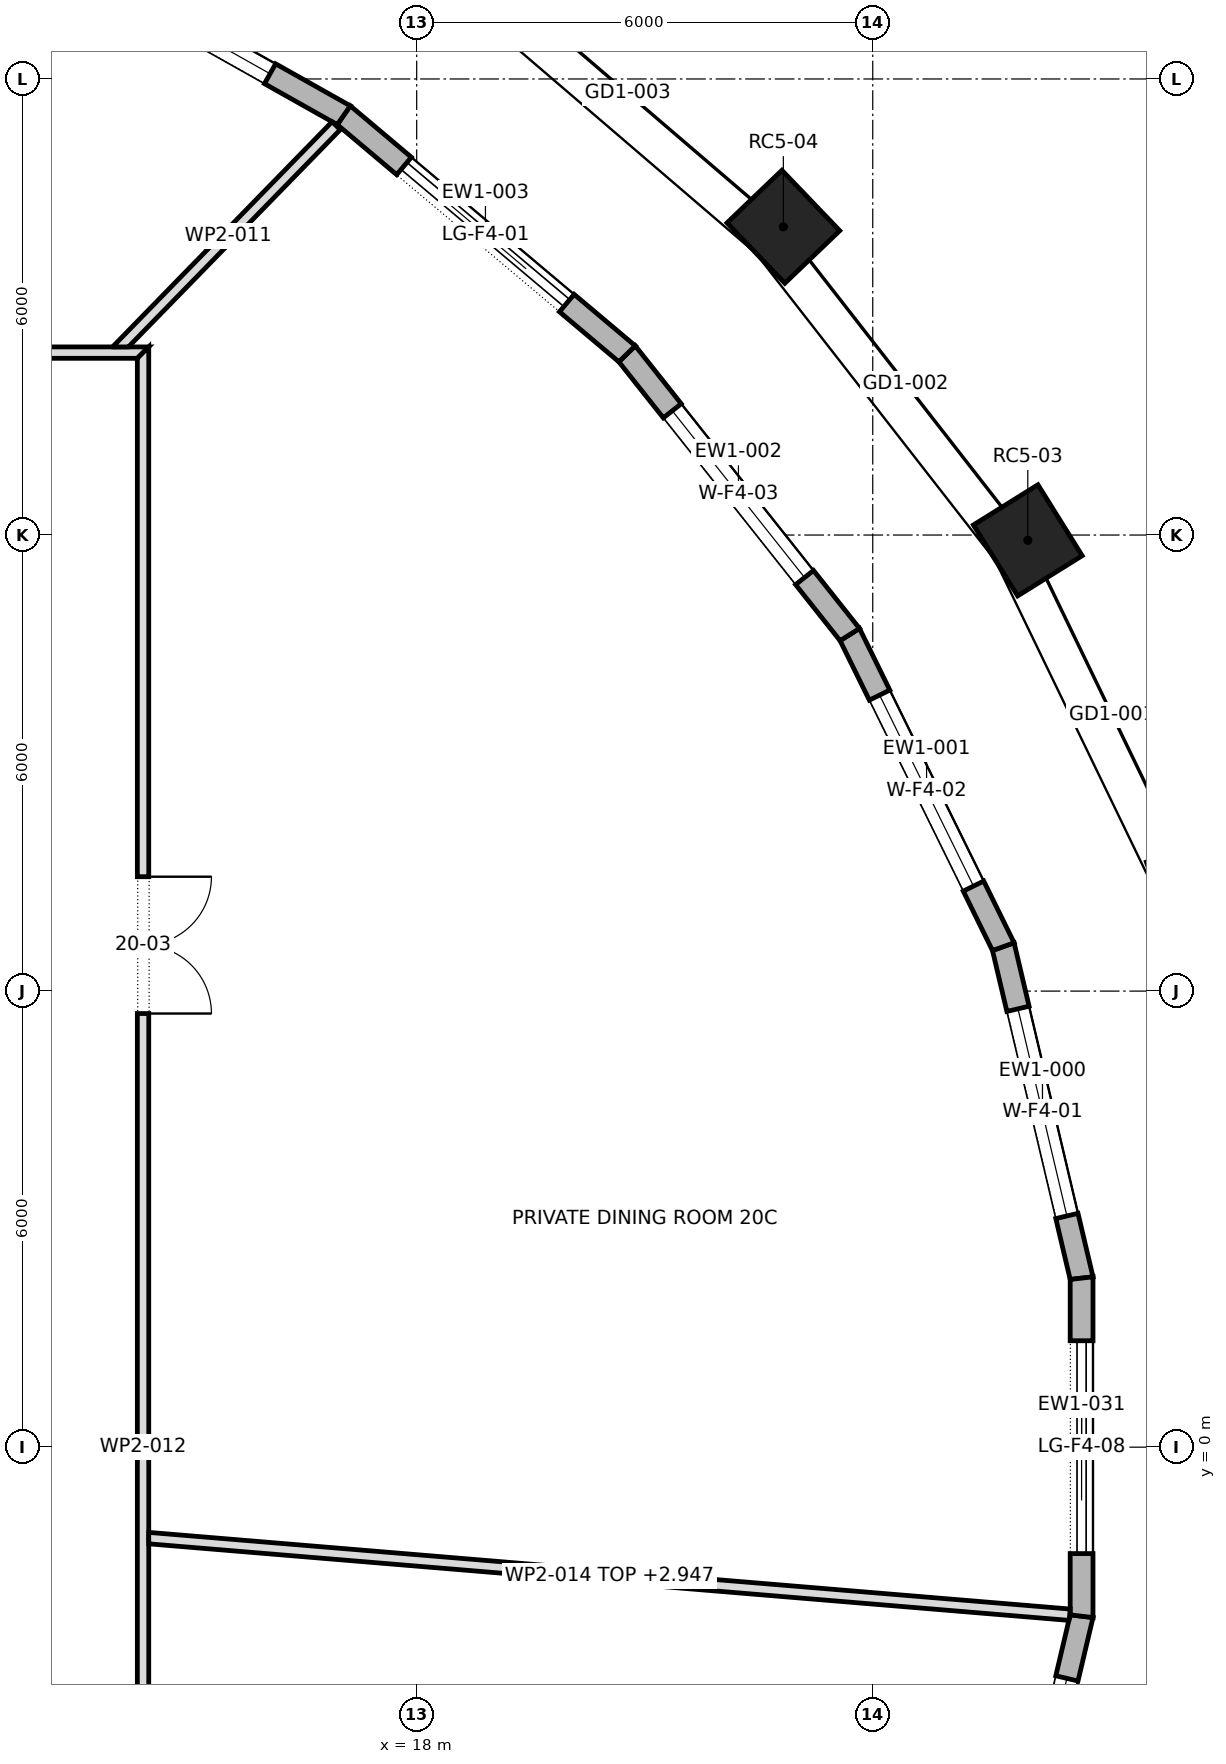
"""IFC4 building model, lengths in metres.
Left out: names, types, materials, properties, quantities, classifications, styles, units other than length and angle.
Written with IfcOpenShell. Run it as: python <this file> out.ifc"""

import sys

from ifc_helpers import new_model, si_unit, direction, frame, frame_2d, origin, origin_2d, place, context, subcontext, project, spatial, polyline, rectangle, outline, extrude, element, fill, save


model = new_model("IFC4")
c1 = context("Model", 3, precision=1e-05, world=origin(), true_north=direction((0.0, 1.0)))
c2 = subcontext(c1, "Body", "Model", "MODEL_VIEW")
j1 = project(units=[si_unit("LENGTHUNIT", "METRE"), si_unit("PLANEANGLEUNIT", "RADIAN")], contexts=[c1])
p1 = place(None, origin())
s1 = spatial("IfcSite", under=j1, at=p1, CompositionType="ELEMENT")
p2 = place(p1, origin())
s2 = spatial("IfcBuilding", under=s1, at=p2, CompositionType="ELEMENT")
p3 = place(p2, frame((0.0, 0.0, 280.3)))
s3 = spatial("IfcBuildingStorey", under=s2, at=p3, CompositionType="ELEMENT", Elevation=280.3)
for number, where, z_axis, x_axis in (
    (1, (28.255, 7.347, 0.0), (0.0, 0.0, 1.0), (-0.334, 0.943, 0.0)),
    (2, (26.04, 11.93, 0.0), (0.0, 0.0, 1.0), (-0.529, 0.849, 0.0)),
    (3, (22.824, 16.055, 0.0), (0.0, 0.0, 1.0), (-0.692, 0.722, 0.0)),
):
    element("IfcColumn", number, at=place(p3, frame(where, z_axis=z_axis, x_axis=x_axis)), inside=s3, PredefinedType="COLUMN", context=c2, shape_type="SweptSolid", body=[
        extrude(rectangle(XDim=1.1, YDim=1.0, at=origin_2d()), origin(), (0.0, 0.0, 1.0), 4.0),
    ])
p4 = place(p3, frame((26.748, 2.224, 0.0), z_axis=(0.0, 0.0, 1.0), x_axis=(-0.229862207503, 0.973223183839, 0.0)))
e4 = element("IfcWall", 4, at=p4, inside=s3, PredefinedType="STANDARD", context=c2, shape_type="SweptSolid", body=[
    extrude(outline(polyline([(-0.018, -0.15), (4.498, -0.15), (4.464, 0.15), (0.018, 0.15), (-0.018, -0.15)])), origin(), (0.0, 0.0, 1.0), 3.7),
])
p5 = place(p4, frame((0.841, 0.0, 0.6)))
e5 = element("IfcOpeningElement", 5, at=p5, cuts=e4, PredefinedType="OPENING", context=c2, shape_type="SweptSolid", body=[
    extrude(rectangle(XDim=2.8, YDim=2.65, at=frame_2d((1.4, 1.325))), frame((0.0, 0.162, 0.0), z_axis=(0.0, -1.0, 0.0), x_axis=(1.0, 0.0, 0.0)), (0.0, 0.0, 1.0), 0.324),
])
p6 = place(p3, frame((25.718, 6.585, 0.0), z_axis=(0.0, 0.0, 1.0), x_axis=(-0.441335149795, 0.897342345794, 0.0)))
e6 = element("IfcWall", 6, at=p6, inside=s3, PredefinedType="STANDARD", context=c2, shape_type="SweptSolid", body=[
    extrude(outline(polyline([(-0.017, -0.15), (4.592, -0.15), (4.56, 0.15), (0.017, 0.15), (-0.017, -0.15)])), origin(), (0.0, 0.0, 1.0), 3.7),
])
p7 = place(p6, frame((0.888, 0.0, 0.6)))
e7 = element("IfcOpeningElement", 7, at=p7, cuts=e6, PredefinedType="OPENING", context=c2, shape_type="SweptSolid", body=[
    extrude(rectangle(XDim=2.8, YDim=2.65, at=frame_2d((1.4, 1.325))), frame((0.0, 0.162, 0.0), z_axis=(0.0, -1.0, 0.0), x_axis=(1.0, 0.0, 0.0)), (0.0, 0.0, 1.0), 0.324),
])
p8 = place(p3, frame((23.698, 10.691, 0.0), z_axis=(0.0, 0.0, 1.0), x_axis=(-0.621544881236, 0.783378555112, 0.0)))
e8 = element("IfcWall", 8, at=p8, inside=s3, PredefinedType="STANDARD", context=c2, shape_type="SweptSolid", body=[
    extrude(outline(polyline([(-0.016, -0.15), (4.729, -0.15), (4.699, 0.15), (0.016, 0.15), (-0.016, -0.15)])), origin(), (0.0, 0.0, 1.0), 3.7),
])
p9 = place(p8, frame((0.957, 0.0, 0.6)))
e9 = element("IfcOpeningElement", 9, at=p9, cuts=e8, PredefinedType="OPENING", context=c2, shape_type="SweptSolid", body=[
    extrude(rectangle(XDim=2.8, YDim=2.65, at=frame_2d((1.4, 1.325))), frame((0.0, 0.162, 0.0), z_axis=(0.0, -1.0, 0.0), x_axis=(1.0, 0.0, 0.0)), (0.0, 0.0, 1.0), 0.324),
])
p10 = place(p3, frame((20.768, 14.384, 0.0), z_axis=(0.0, 0.0, 1.0), x_axis=(-0.764876116592, 0.644177402792, 0.0)))
e10 = element("IfcWall", 10, at=p10, inside=s3, PredefinedType="STANDARD", context=c2, shape_type="SweptSolid", body=[
    extrude(outline(polyline([(-0.015, -0.15), (4.887, -0.15), (4.859, 0.15), (0.015, 0.15), (-0.015, -0.15)])), origin(), (0.0, 0.0, 1.0), 3.7),
])
p11 = place(p10, frame((1.036, 0.0, 0.0)))
e11 = element("IfcOpeningElement", 11, at=p11, cuts=e10, PredefinedType="OPENING", context=c2, shape_type="SweptSolid", body=[
    extrude(rectangle(XDim=2.8, YDim=3.25, at=frame_2d((1.4, 1.625))), frame((0.0, 0.162, 0.0), z_axis=(0.0, -1.0, 0.0), x_axis=(1.0, 0.0, 0.0)), (0.0, 0.0, 1.0), 0.324),
])
p12 = place(p3, frame((17.041, 17.523, 0.0), z_axis=(0.0, 0.0, 1.0), x_axis=(-0.871488606878, 0.490415750239, 0.0)))
e12 = element("IfcWall", 12, at=p12, inside=s3, PredefinedType="STANDARD", context=c2, shape_type="SweptSolid", body=[
    extrude(outline(polyline([(-0.014, -0.15), (5.039, -0.15), (5.013, 0.15), (0.014, 0.15), (-0.014, -0.15)])), origin(), (0.0, 0.0, 1.0), 3.7),
])
p13 = place(p12, frame((1.113, 0.0, 0.6)))
e13 = element("IfcOpeningElement", 13, at=p13, cuts=e12, PredefinedType="OPENING", context=c2, shape_type="SweptSolid", body=[
    extrude(rectangle(XDim=2.8, YDim=2.65, at=frame_2d((1.4, 1.325))), frame((0.0, 0.162, 0.0), z_axis=(0.0, -1.0, 0.0), x_axis=(1.0, 0.0, 0.0)), (0.0, 0.0, 1.0), 0.324),
])
p14 = place(p3, frame((25.718, -6.585, 0.0), z_axis=(0.0, 0.0, 1.0), x_axis=(0.229862207503, 0.973223183839, 0.0)))
e14 = element("IfcWall", 14, at=p14, inside=s3, PredefinedType="STANDARD", context=c2, shape_type="SweptSolid", body=[
    extrude(outline(polyline([(-0.017, -0.15), (4.499, -0.15), (4.463, 0.15), (0.017, 0.15), (-0.017, -0.15)])), origin(), (0.0, 0.0, 1.0), 3.7),
])
p15 = place(p14, frame((0.841, 0.0, 0.6)))
e15 = element("IfcOpeningElement", 15, at=p15, cuts=e14, PredefinedType="OPENING", context=c2, shape_type="SweptSolid", body=[
    extrude(rectangle(XDim=2.8, YDim=2.65, at=frame_2d((1.4, 1.325))), frame((0.0, 0.162, 0.0), z_axis=(0.0, -1.0, 0.0), x_axis=(1.0, 0.0, 0.0)), (0.0, 0.0, 1.0), 0.324),
])
p16 = place(p3, frame((26.748, -2.224, 0.0), z_axis=(0.0, 0.0, 1.0), x_axis=(0.0, 1.0, 0.0)))
e16 = element("IfcWall", 16, at=p16, inside=s3, PredefinedType="STANDARD", context=c2, shape_type="SweptSolid", body=[
    extrude(outline(polyline([(-0.018, -0.15), (4.465, -0.15), (4.43, 0.15), (0.018, 0.15), (-0.018, -0.15)])), origin(), (0.0, 0.0, 1.0), 3.7),
])
p17 = place(p16, frame((0.824, 0.0, 0.0)))
e17 = element("IfcOpeningElement", 17, at=p17, cuts=e16, PredefinedType="OPENING", context=c2, shape_type="SweptSolid", body=[
    extrude(rectangle(XDim=2.8, YDim=3.25, at=frame_2d((1.4, 1.625))), frame((0.0, 0.162, 0.0), z_axis=(0.0, -1.0, 0.0), x_axis=(1.0, 0.0, 0.0)), (0.0, 0.0, 1.0), 0.324),
])
p18 = place(p3, frame((-14.475, 14.4, 0.0), z_axis=(0.0, 0.0, 1.0), x_axis=(1.0, 0.0, 0.0)))
e18 = element("IfcWall", 18, at=p18, inside=s3, PredefinedType="PARTITIONING", context=c2, shape_type="SweptSolid", body=[
    extrude(outline(polyline([(0.15, -0.075), (2.06, -0.075), (3.97, -0.075), (5.88, -0.075), (7.79, -0.075), (9.7, -0.075), (11.61, -0.075), (13.52, -0.075), (15.43, -0.075), (17.34, -0.075), (19.25, -0.075), (21.16, -0.075), (23.07, -0.075), (24.98, -0.075), (26.89, -0.075), (28.8, -0.075), (28.95, 0.075), (27.02, 0.075), (25.09, 0.075), (23.16, 0.075), (21.23, 0.075), (19.3, 0.075), (17.37, 0.075), (15.44, 0.075), (13.51, 0.075), (11.58, 0.075), (9.65, 0.075), (7.72, 0.075), (5.79, 0.075), (3.86, 0.075), (1.93, 0.075), (0.0, 0.075), (0.15, -0.075)])), origin(), (0.0, 0.0, 1.0), 3.7),
])
p19 = place(p18, frame((20.15, 0.0, 0.0)))
e19 = element("IfcOpeningElement", 19, at=p19, cuts=e18, PredefinedType="OPENING", context=c2, shape_type="SweptSolid", body=[
    extrude(rectangle(XDim=1.0, YDim=2.1, at=frame_2d((0.5, 1.05))), frame((0.0, 0.087, 0.0), z_axis=(0.0, -1.0, 0.0), x_axis=(1.0, 0.0, 0.0)), (0.0, 0.0, 1.0), 0.174),
])
p20 = place(p18, frame((8.565, 0.0, 0.0)))
e20 = element("IfcOpeningElement", 20, at=p20, cuts=e18, PredefinedType="OPENING", context=c2, shape_type="SweptSolid", body=[
    extrude(rectangle(XDim=1.0, YDim=2.1, at=frame_2d((0.5, 1.05))), frame((0.0, 0.087, 0.0), z_axis=(0.0, -1.0, 0.0), x_axis=(1.0, 0.0, 0.0)), (0.0, 0.0, 1.0), 0.174),
])
p21 = place(p18, frame((2.205, 0.0, 0.0)))
e21 = element("IfcOpeningElement", 21, at=p21, cuts=e18, PredefinedType="OPENING", context=c2, shape_type="SweptSolid", body=[
    extrude(rectangle(XDim=1.0, YDim=2.1, at=frame_2d((0.5, 1.05))), frame((0.0, 0.087, 0.0), z_axis=(0.0, -1.0, 0.0), x_axis=(1.0, 0.0, 0.0)), (0.0, 0.0, 1.0), 0.174),
])
p22 = place(p3, frame((14.052, 14.423, 0.0), z_axis=(0.0, 0.0, 1.0), x_axis=(0.698170464683, 0.715931562542, 0.0)))
e22 = element("IfcWall", 22, at=p22, inside=s3, PredefinedType="PARTITIONING", context=c2, shape_type="SweptSolid", body=[
    extrude(outline(polyline([(4.137, -0.075), (4.137, 0.075), (4.137, 0.075), (2.758, 0.075), (1.379, 0.075), (0.0, 0.075), (0.0, 0.075), (0.146, -0.075), (2.142, -0.075), (4.137, -0.075)])), origin(), (0.0, 0.0, 1.0), 3.7),
])
p23 = place(p3, frame((14.4, -14.475, 0.0), z_axis=(0.0, 0.0, 1.0), x_axis=(0.0, 1.0, 0.0)))
e23 = element("IfcWall", 23, at=p23, inside=s3, PredefinedType="PARTITIONING", context=c2, shape_type="SweptSolid", body=[
    extrude(outline(polyline([(0.0, -0.075), (1.93, -0.075), (3.86, -0.075), (5.79, -0.075), (7.72, -0.075), (9.65, -0.075), (11.58, -0.075), (13.51, -0.075), (15.44, -0.075), (17.37, -0.075), (19.3, -0.075), (21.23, -0.075), (23.16, -0.075), (25.09, -0.075), (27.02, -0.075), (28.95, -0.075), (28.8, 0.075), (26.89, 0.075), (24.98, 0.075), (23.07, 0.075), (21.16, 0.075), (19.25, 0.075), (17.34, 0.075), (15.43, 0.075), (13.52, 0.075), (11.61, 0.075), (9.7, 0.075), (7.79, 0.075), (5.88, 0.075), (3.97, 0.075), (2.06, 0.075), (0.15, 0.075), (0.0, -0.075)])), origin(), (0.0, 0.0, 1.0), 3.7),
])
p24 = place(p23, frame((3.535, 0.0, 0.0)))
e24 = element("IfcOpeningElement", 24, at=p24, cuts=e23, PredefinedType="OPENING", context=c2, shape_type="SweptSolid", body=[
    extrude(rectangle(XDim=1.0, YDim=2.1, at=frame_2d((0.5, 1.05))), frame((0.0, 0.087, 0.0), z_axis=(0.0, -1.0, 0.0), x_axis=(1.0, 0.0, 0.0)), (0.0, 0.0, 1.0), 0.174),
])
p25 = place(p23, frame((10.14, 0.0, 0.0)))
e25 = element("IfcOpeningElement", 25, at=p25, cuts=e23, PredefinedType="OPENING", context=c2, shape_type="SweptSolid", body=[
    extrude(rectangle(XDim=1.0, YDim=2.1, at=frame_2d((0.5, 1.05))), frame((0.0, 0.087, 0.0), z_axis=(0.0, -1.0, 0.0), x_axis=(1.0, 0.0, 0.0)), (0.0, 0.0, 1.0), 0.174),
])
p26 = place(p23, frame((20.18, 0.0, 0.0)))
e26 = element("IfcOpeningElement", 26, at=p26, cuts=e23, PredefinedType="OPENING", context=c2, shape_type="SweptSolid", body=[
    extrude(rectangle(XDim=1.8, YDim=2.1, at=frame_2d((0.9, 1.05))), frame((0.0, 0.087, 0.0), z_axis=(0.0, -1.0, 0.0), x_axis=(1.0, 0.0, 0.0)), (0.0, 0.0, 1.0), 0.174),
])
p27 = place(p3, frame((14.469, -1.196, 0.0), z_axis=(0.0, 0.0, 1.0), x_axis=(0.996556684965, -0.08291425481, 0.0)))
e27 = element("IfcWall", 27, at=p27, inside=s3, PredefinedType="PARTITIONING", context=c2, shape_type="SweptSolid", body=[
    extrude(outline(polyline([(0.012, -0.075), (1.747, -0.075), (3.483, -0.075), (5.218, -0.075), (6.953, -0.075), (8.689, -0.075), (10.424, -0.075), (12.159, -0.075), (12.164, -0.045), (12.164, 0.075), (10.426, 0.075), (8.688, 0.075), (6.951, 0.075), (5.213, 0.075), (3.475, 0.075), (1.738, 0.075), (0.0, 0.075), (0.0, 0.07), (0.012, -0.075)])), origin(), (0.0, 0.0, 1.0), 2.947),
])
p28 = place(p5, origin())
e28 = element("IfcWindow", 28, at=p28, inside=s3, PartitioningType="DOUBLE_PANEL_VERTICAL", PredefinedType="WINDOW", context=c2, shape_type="SweptSolid", body=[
    extrude(rectangle(XDim=2.8, YDim=2.65, at=frame_2d((1.4, 1.325))), frame((0.0, 0.03, 0.0), z_axis=(0.0, -1.0, 0.0), x_axis=(1.0, 0.0, 0.0)), (0.0, 0.0, 1.0), 0.06),
])
fill(e5, e28)
p29 = place(p7, origin())
e29 = element("IfcWindow", 29, at=p29, inside=s3, PartitioningType="DOUBLE_PANEL_VERTICAL", PredefinedType="WINDOW", context=c2, shape_type="SweptSolid", body=[
    extrude(rectangle(XDim=2.8, YDim=2.65, at=frame_2d((1.4, 1.325))), frame((0.0, 0.03, 0.0), z_axis=(0.0, -1.0, 0.0), x_axis=(1.0, 0.0, 0.0)), (0.0, 0.0, 1.0), 0.06),
])
fill(e7, e29)
p30 = place(p9, origin())
e30 = element("IfcWindow", 30, at=p30, inside=s3, PartitioningType="DOUBLE_PANEL_VERTICAL", PredefinedType="WINDOW", context=c2, shape_type="SweptSolid", body=[
    extrude(rectangle(XDim=2.8, YDim=2.65, at=frame_2d((1.4, 1.325))), frame((0.0, 0.03, 0.0), z_axis=(0.0, -1.0, 0.0), x_axis=(1.0, 0.0, 0.0)), (0.0, 0.0, 1.0), 0.06),
])
fill(e9, e30)
p31 = place(p11, origin())
e31 = element("IfcDoor", 31, at=p31, inside=s3, OperationType="DOUBLE_DOOR_SLIDING", PredefinedType="DOOR", context=c2, shape_type="SweptSolid", body=[
    extrude(rectangle(XDim=2.8, YDim=3.25, at=frame_2d((1.4, 1.625))), frame((0.0, 0.025, 0.0), z_axis=(0.0, -1.0, 0.0), x_axis=(1.0, 0.0, 0.0)), (0.0, 0.0, 1.0), 0.05),
])
fill(e11, e31)
p32 = place(p13, origin())
e32 = element("IfcWindow", 32, at=p32, inside=s3, PartitioningType="DOUBLE_PANEL_VERTICAL", PredefinedType="WINDOW", context=c2, shape_type="SweptSolid", body=[
    extrude(rectangle(XDim=2.8, YDim=2.65, at=frame_2d((1.4, 1.325))), frame((0.0, 0.03, 0.0), z_axis=(0.0, -1.0, 0.0), x_axis=(1.0, 0.0, 0.0)), (0.0, 0.0, 1.0), 0.06),
])
fill(e13, e32)
p33 = place(p15, origin())
e33 = element("IfcWindow", 33, at=p33, inside=s3, PartitioningType="DOUBLE_PANEL_VERTICAL", PredefinedType="WINDOW", context=c2, shape_type="SweptSolid", body=[
    extrude(rectangle(XDim=2.8, YDim=2.65, at=frame_2d((1.4, 1.325))), frame((0.0, 0.03, 0.0), z_axis=(0.0, -1.0, 0.0), x_axis=(1.0, 0.0, 0.0)), (0.0, 0.0, 1.0), 0.06),
])
fill(e15, e33)
p34 = place(p17, origin())
e34 = element("IfcDoor", 34, at=p34, inside=s3, OperationType="DOUBLE_DOOR_SLIDING", PredefinedType="DOOR", context=c2, shape_type="SweptSolid", body=[
    extrude(rectangle(XDim=2.8, YDim=3.25, at=frame_2d((1.4, 1.625))), frame((0.0, 0.025, 0.0), z_axis=(0.0, -1.0, 0.0), x_axis=(1.0, 0.0, 0.0)), (0.0, 0.0, 1.0), 0.05),
])
fill(e17, e34)
p35 = place(p26, frame((1.8, 0.0, 0.0), z_axis=(0.0, 0.0, 1.0), x_axis=(-1.0, 0.0, 0.0)))
e35 = element("IfcDoor", 35, at=p35, inside=s3, OperationType="DOUBLE_DOOR_SINGLE_SWING", PredefinedType="DOOR", context=c2, shape_type="SweptSolid", body=[
    extrude(rectangle(XDim=1.8, YDim=2.1, at=frame_2d((0.9, 1.05))), frame((0.0, 0.025, 0.0), z_axis=(0.0, -1.0, 0.0), x_axis=(1.0, 0.0, 0.0)), (0.0, 0.0, 1.0), 0.05),
])
fill(e26, e35)
save(model, sys.argv[1])
